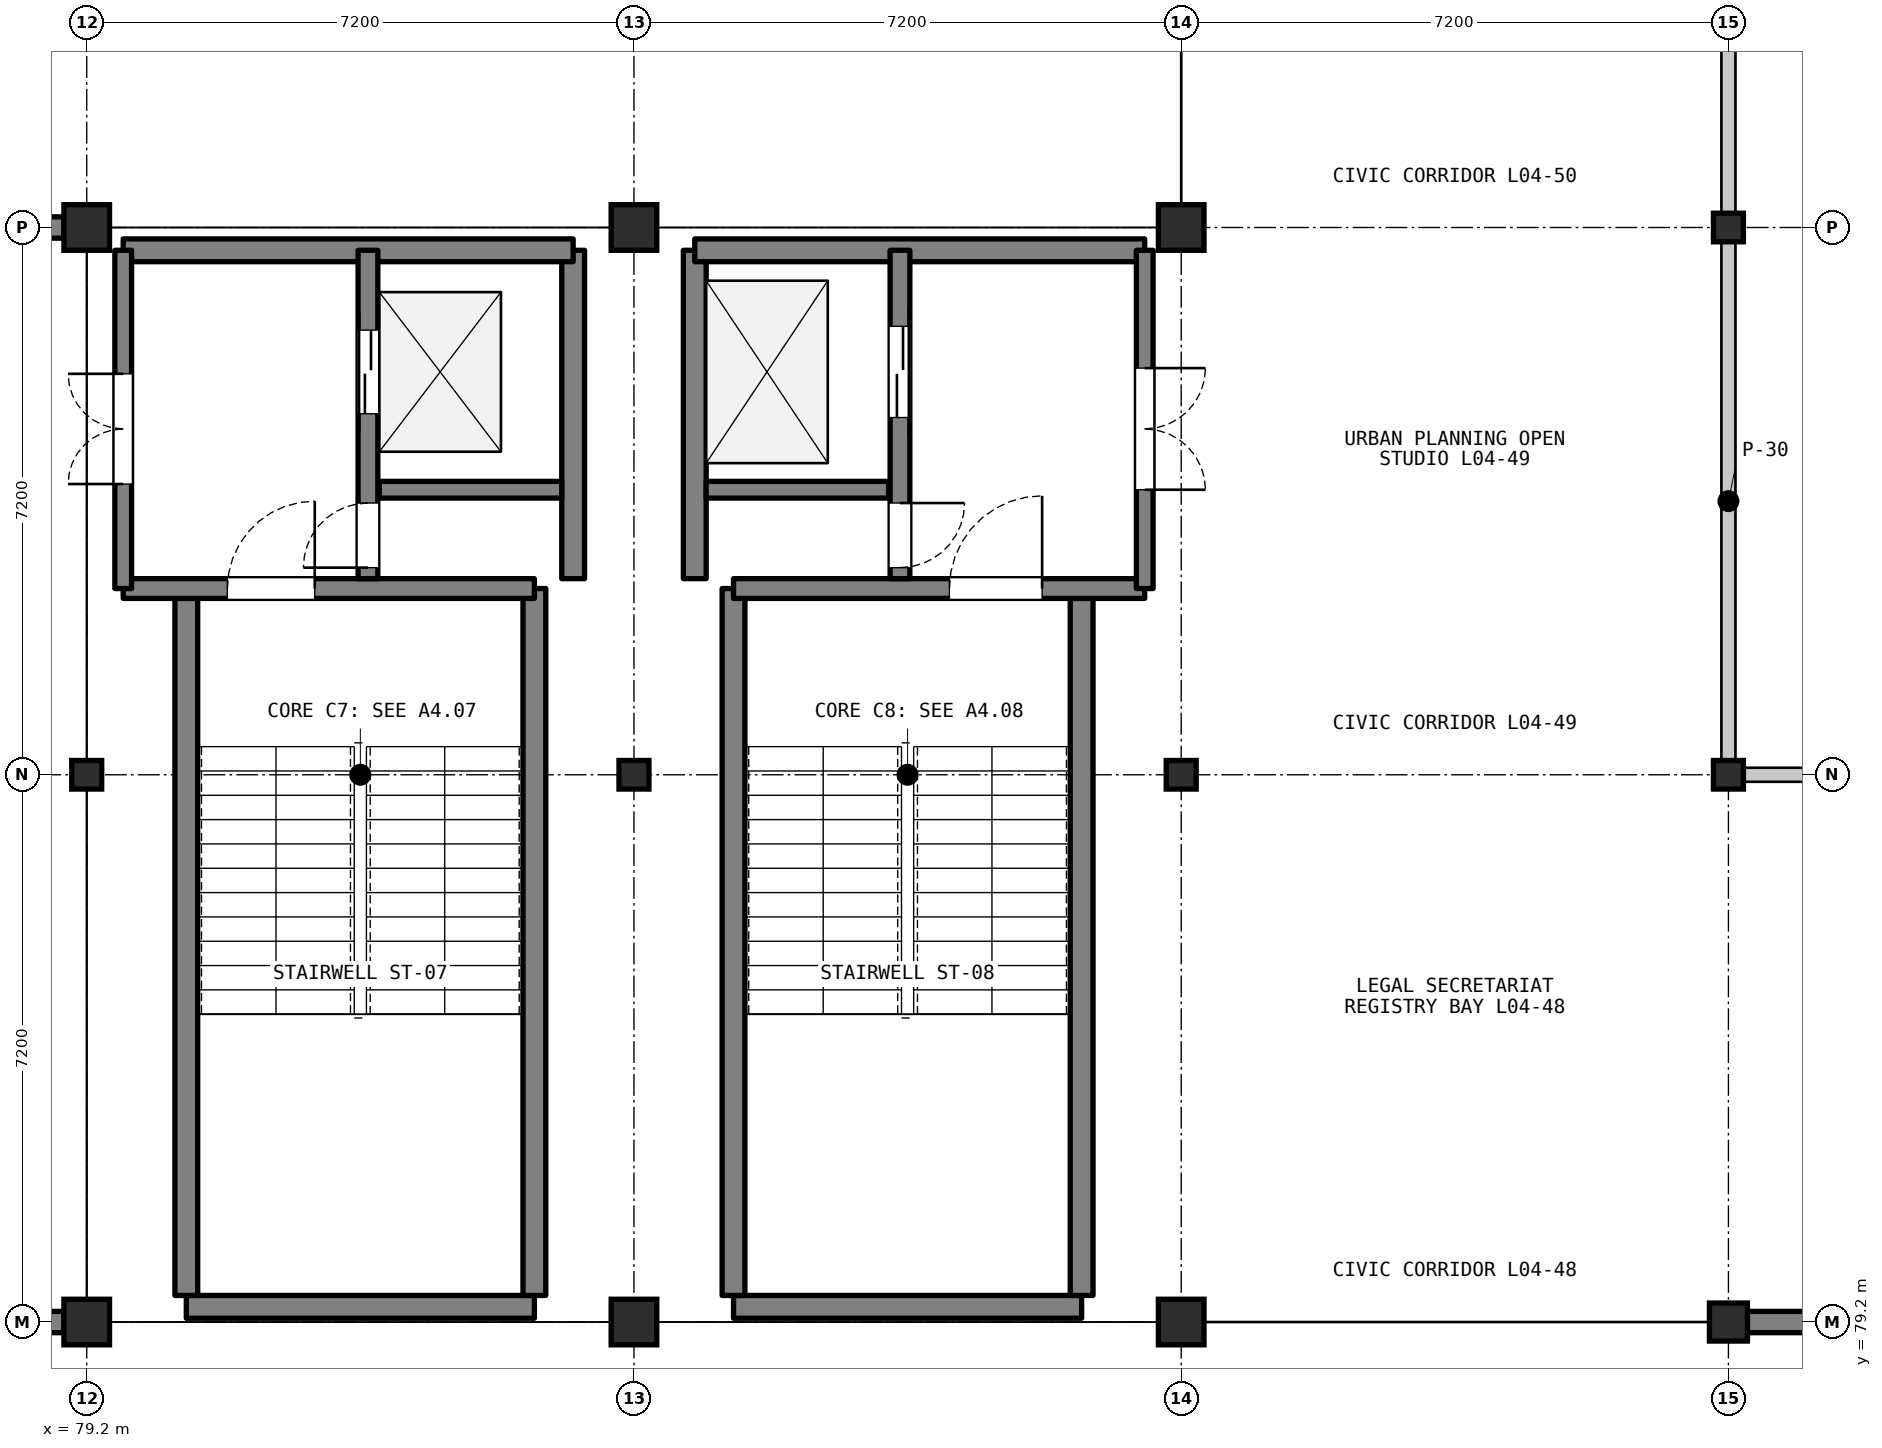
"""IFC4 building model, lengths in metres.
Left out: names, types, materials, properties, quantities, classifications, styles, units other than length and angle.
Written with IfcOpenShell. Run it as: python <this file> out.ifc"""

import sys

from ifc_helpers import new_model, si_unit, direction, frame, frame_2d, origin, origin_2d, place, context, subcontext, project, spatial, rectangle, i_section, extrude, element, fill, save


model = new_model("IFC4")
c1 = context("Model", 3, precision=1e-05, world=origin(), true_north=direction((0.0, 1.0)))
c2 = subcontext(c1, "Body", "Model", "MODEL_VIEW")
j1 = project(units=[si_unit("LENGTHUNIT", "METRE"), si_unit("PLANEANGLEUNIT", "RADIAN")], contexts=[c1])
p1 = place(None, origin())
s1 = spatial("IfcSite", under=j1, at=p1, CompositionType="ELEMENT")
p2 = place(p1, origin())
s2 = spatial("IfcBuilding", under=s1, at=p2, CompositionType="ELEMENT")
p3 = place(p2, frame((0.0, 0.0, 14.1)))
s3 = spatial("IfcBuildingStorey", under=s2, at=p3, CompositionType="ELEMENT", Elevation=14.1)
p4 = place(p3, frame((79.2, 79.2, 0.0), z_axis=(0.0, 0.0, 1.0), x_axis=(1.0, 0.0, 0.0)))
e1 = element("IfcColumn", 1, at=p4, inside=s3, PredefinedType="COLUMN", context=c2, shape_type="SweptSolid", body=[
    extrude(rectangle(XDim=0.6, YDim=0.6, at=origin_2d()), origin(), (0.0, 0.0, 1.0), 3.9),
])
p5 = place(p3, frame((79.2, 86.4, 0.0), z_axis=(0.0, 0.0, 1.0), x_axis=(1.0, 0.0, 0.0)))
e2 = element("IfcColumn", 2, at=p5, inside=s3, PredefinedType="COLUMN", context=c2, shape_type="SweptSolid", body=[
    extrude(i_section(OverallWidth=0.394, OverallDepth=0.376, WebThickness=0.017, FlangeThickness=0.028, FilletRadius=0.015, at=origin_2d()), origin(), (0.0, 0.0, 1.0), 3.9),
])
for number, where, z_axis, x_axis in (
    (3, (79.2, 93.6, 0.0), (0.0, 0.0, 1.0), (1.0, 0.0, 0.0)),
    (4, (86.4, 79.2, 0.0), (0.0, 0.0, 1.0), (1.0, 0.0, 0.0)),
):
    element("IfcColumn", number, at=place(p3, frame(where, z_axis=z_axis, x_axis=x_axis)), inside=s3, PredefinedType="COLUMN", context=c2, shape_type="SweptSolid", body=[
        extrude(rectangle(XDim=0.6, YDim=0.6, at=origin_2d()), origin(), (0.0, 0.0, 1.0), 3.9),
    ])
p6 = place(p3, frame((86.4, 86.4, 0.0), z_axis=(0.0, 0.0, 1.0), x_axis=(1.0, 0.0, 0.0)))
e5 = element("IfcColumn", 5, at=p6, inside=s3, PredefinedType="COLUMN", context=c2, shape_type="SweptSolid", body=[
    extrude(i_section(OverallWidth=0.394, OverallDepth=0.376, WebThickness=0.017, FlangeThickness=0.028, FilletRadius=0.015, at=origin_2d()), origin(), (0.0, 0.0, 1.0), 3.9),
])
for number, where, z_axis, x_axis in (
    (6, (86.4, 93.6, 0.0), (0.0, 0.0, 1.0), (1.0, 0.0, 0.0)),
    (7, (93.6, 79.2, 0.0), (0.0, 0.0, 1.0), (1.0, 0.0, 0.0)),
):
    element("IfcColumn", number, at=place(p3, frame(where, z_axis=z_axis, x_axis=x_axis)), inside=s3, PredefinedType="COLUMN", context=c2, shape_type="SweptSolid", body=[
        extrude(rectangle(XDim=0.6, YDim=0.6, at=origin_2d()), origin(), (0.0, 0.0, 1.0), 3.9),
    ])
p7 = place(p3, frame((93.6, 86.4, 0.0), z_axis=(0.0, 0.0, 1.0), x_axis=(1.0, 0.0, 0.0)))
e8 = element("IfcColumn", 8, at=p7, inside=s3, PredefinedType="COLUMN", context=c2, shape_type="SweptSolid", body=[
    extrude(i_section(OverallWidth=0.394, OverallDepth=0.376, WebThickness=0.017, FlangeThickness=0.028, FilletRadius=0.015, at=origin_2d()), origin(), (0.0, 0.0, 1.0), 3.9),
])
p8 = place(p3, frame((93.6, 93.6, 0.0), z_axis=(0.0, 0.0, 1.0), x_axis=(1.0, 0.0, 0.0)))
e9 = element("IfcColumn", 9, at=p8, inside=s3, PredefinedType="COLUMN", context=c2, shape_type="SweptSolid", body=[
    extrude(rectangle(XDim=0.6, YDim=0.6, at=origin_2d()), origin(), (0.0, 0.0, 1.0), 3.9),
])
p9 = place(p3, frame((100.8, 79.2, 0.0), z_axis=(0.0, 0.0, 1.0), x_axis=(1.0, 0.0, 0.0)))
e10 = element("IfcColumn", 10, at=p9, inside=s3, PredefinedType="COLUMN", context=c2, shape_type="SweptSolid", body=[
    extrude(rectangle(XDim=0.5, YDim=0.5, at=origin_2d()), origin(), (0.0, 0.0, 1.0), 3.9),
])
for number, where, z_axis, x_axis in (
    (11, (100.8, 86.4, 0.0), (0.0, 0.0, 1.0), (1.0, 0.0, 0.0)),
    (12, (100.8, 93.6, 0.0), (0.0, 0.0, 1.0), (1.0, 0.0, 0.0)),
):
    element("IfcColumn", number, at=place(p3, frame(where, z_axis=z_axis, x_axis=x_axis)), inside=s3, PredefinedType="COLUMN", context=c2, shape_type="SweptSolid", body=[
        extrude(i_section(OverallWidth=0.394, OverallDepth=0.376, WebThickness=0.017, FlangeThickness=0.028, FilletRadius=0.015, at=origin_2d()), origin(), (0.0, 0.0, 1.0), 3.9),
    ])
for number, where, z_axis, x_axis in (
    (13, (78.9, 79.2, 0.0), (0.0, 0.0, 1.0), (-1.0, 0.0, 0.0)),
    (14, (72.3, 93.6, 0.0), (0.0, 0.0, 1.0), (1.0, 0.0, 0.0)),
):
    element("IfcWall", number, at=place(p3, frame(where, z_axis=z_axis, x_axis=x_axis)), inside=s3, PredefinedType="SOLIDWALL", context=c2, shape_type="SweptSolid", body=[
        extrude(rectangle(XDim=6.6, YDim=0.28, at=frame_2d((3.3, 0.0))), origin(), (0.0, 0.0, 1.0), 3.118),
    ])
p10 = place(p3, frame((107.75, 79.2, 0.0), z_axis=(0.0, 0.0, 1.0), x_axis=(-1.0, 0.0, 0.0)))
e15 = element("IfcWall", 15, at=p10, inside=s3, PredefinedType="SOLIDWALL", context=c2, shape_type="SweptSolid", body=[
    extrude(rectangle(XDim=6.7, YDim=0.28, at=frame_2d((3.35, 0.0))), origin(), (0.0, 0.0, 1.0), 3.098),
])
p11 = place(p10, frame((1.008, 0.0, 0.95)))
e16 = element("IfcOpeningElement", 16, at=p11, cuts=e15, PredefinedType="OPENING", context=c2, shape_type="SweptSolid", body=[
    extrude(rectangle(XDim=1.2, YDim=1.7, at=frame_2d((0.6, 0.85))), frame((0.0, 0.15, 0.0), z_axis=(0.0, -1.0, 0.0), x_axis=(1.0, 0.0, 0.0)), (0.0, 0.0, 1.0), 0.3),
])
p12 = place(p10, frame((4.492, 0.0, 0.95)))
e17 = element("IfcOpeningElement", 17, at=p12, cuts=e15, PredefinedType="OPENING", context=c2, shape_type="SweptSolid", body=[
    extrude(rectangle(XDim=1.2, YDim=1.7, at=frame_2d((0.6, 0.85))), frame((0.0, 0.15, 0.0), z_axis=(0.0, -1.0, 0.0), x_axis=(1.0, 0.0, 0.0)), (0.0, 0.0, 1.0), 0.3),
])
p13 = place(p3, frame((80.51, 79.4, 0.0), z_axis=(0.0, 0.0, 1.0), x_axis=(1.0, 0.0, 0.0)))
e18 = element("IfcWall", 18, at=p13, inside=s3, PredefinedType="SHEAR", context=c2, shape_type="SweptSolid", body=[
    extrude(rectangle(XDim=4.58, YDim=0.3, at=frame_2d((2.29, 0.0))), origin(), (0.0, 0.0, 1.0), 3.72),
])
for number, where, z_axis, x_axis in (
    (19, (80.51, 79.55, 0.0), (0.0, 0.0, 1.0), (0.0, 1.0, 0.0)),
    (20, (85.09, 79.55, 0.0), (0.0, 0.0, 1.0), (0.0, 1.0, 0.0)),
):
    element("IfcWall", number, at=place(p3, frame(where, z_axis=z_axis, x_axis=x_axis)), inside=s3, PredefinedType="SHEAR", context=c2, shape_type="SweptSolid", body=[
        extrude(rectangle(XDim=9.3, YDim=0.3, at=frame_2d((4.65, 0.0))), origin(), (0.0, 0.0, 1.0), 3.72),
    ])
p14 = place(p3, frame((79.68, 88.85, 0.0), z_axis=(0.0, 0.0, 1.0), x_axis=(1.0, 0.0, 0.0)))
e21 = element("IfcWall", 21, at=p14, inside=s3, PredefinedType="SHEAR", context=c2, shape_type="SweptSolid", body=[
    extrude(rectangle(XDim=5.41, YDim=0.26, at=frame_2d((2.705, 0.0))), origin(), (0.0, 0.0, 1.0), 3.72),
])
p15 = place(p14, frame((1.37, 0.0, 0.0)))
e22 = element("IfcOpeningElement", 22, at=p15, cuts=e21, PredefinedType="OPENING", context=c2, shape_type="SweptSolid", body=[
    extrude(rectangle(XDim=1.15, YDim=2.15, at=frame_2d((0.575, 1.075))), frame((0.0, 0.14, 0.0), z_axis=(0.0, -1.0, 0.0), x_axis=(1.0, 0.0, 0.0)), (0.0, 0.0, 1.0), 0.28),
])
p16 = place(p3, frame((85.6, 88.98, 0.0), z_axis=(0.0, 0.0, 1.0), x_axis=(0.0, 1.0, 0.0)))
e23 = element("IfcWall", 23, at=p16, inside=s3, PredefinedType="SHEAR", context=c2, shape_type="SweptSolid", body=[
    extrude(rectangle(XDim=4.32, YDim=0.3, at=frame_2d((2.16, 0.0))), origin(), (0.0, 0.0, 1.0), 3.72),
])
p17 = place(p3, frame((79.68, 93.3, 0.0), z_axis=(0.0, 0.0, 1.0), x_axis=(1.0, 0.0, 0.0)))
e24 = element("IfcWall", 24, at=p17, inside=s3, PredefinedType="SHEAR", context=c2, shape_type="SweptSolid", body=[
    extrude(rectangle(XDim=5.92, YDim=0.3, at=frame_2d((2.96, 0.0))), origin(), (0.0, 0.0, 1.0), 3.72),
])
p18 = place(p3, frame((83.05, 90.15, 0.0), z_axis=(0.0, 0.0, 1.0), x_axis=(1.0, 0.0, 0.0)))
e25 = element("IfcWall", 25, at=p18, inside=s3, PredefinedType="SHEAR", context=c2, shape_type="SweptSolid", body=[
    extrude(rectangle(XDim=2.4, YDim=0.22, at=frame_2d((1.2, 0.0))), origin(), (0.0, 0.0, 1.0), 3.72),
])
p19 = place(p3, frame((82.9, 88.98, 0.0), z_axis=(0.0, 0.0, 1.0), x_axis=(0.0, 1.0, 0.0)))
e26 = element("IfcWall", 26, at=p19, inside=s3, PredefinedType="SHEAR", context=c2, shape_type="SweptSolid", body=[
    extrude(rectangle(XDim=4.32, YDim=0.26, at=frame_2d((2.16, 0.0))), origin(), (0.0, 0.0, 1.0), 3.72),
])
p20 = place(p19, frame((2.17, 0.0, 0.0)))
e27 = element("IfcOpeningElement", 27, at=p20, cuts=e26, PredefinedType="OPENING", context=c2, shape_type="SweptSolid", body=[
    extrude(rectangle(XDim=1.1, YDim=2.15, at=frame_2d((0.55, 1.075))), frame((0.0, 0.14, 0.0), z_axis=(0.0, -1.0, 0.0), x_axis=(1.0, 0.0, 0.0)), (0.0, 0.0, 1.0), 0.28),
])
p21 = place(p19, frame((0.145, 0.0, 0.0)))
e28 = element("IfcOpeningElement", 28, at=p21, cuts=e26, PredefinedType="OPENING", context=c2, shape_type="SweptSolid", body=[
    extrude(rectangle(XDim=0.85, YDim=2.05, at=frame_2d((0.425, 1.025))), frame((0.0, 0.14, 0.0), z_axis=(0.0, -1.0, 0.0), x_axis=(1.0, 0.0, 0.0)), (0.0, 0.0, 1.0), 0.28),
])
p22 = place(p3, frame((79.68, 88.85, 0.0), z_axis=(0.0, 0.0, 1.0), x_axis=(0.0, 1.0, 0.0)))
e29 = element("IfcWall", 29, at=p22, inside=s3, PredefinedType="SHEAR", context=c2, shape_type="SweptSolid", body=[
    extrude(rectangle(XDim=4.45, YDim=0.22, at=frame_2d((2.225, 0.0))), origin(), (0.0, 0.0, 1.0), 3.72),
])
p23 = place(p22, frame((1.375, 0.0, 0.0)))
e30 = element("IfcOpeningElement", 30, at=p23, cuts=e29, PredefinedType="OPENING", context=c2, shape_type="SweptSolid", body=[
    extrude(rectangle(XDim=1.45, YDim=2.2, at=frame_2d((0.725, 1.1))), frame((0.0, 0.12, 0.0), z_axis=(0.0, -1.0, 0.0), x_axis=(1.0, 0.0, 0.0)), (0.0, 0.0, 1.0), 0.24),
])
p24 = place(p3, frame((87.71, 79.4, 0.0), z_axis=(0.0, 0.0, 1.0), x_axis=(1.0, 0.0, 0.0)))
e31 = element("IfcWall", 31, at=p24, inside=s3, PredefinedType="SHEAR", context=c2, shape_type="SweptSolid", body=[
    extrude(rectangle(XDim=4.58, YDim=0.3, at=frame_2d((2.29, 0.0))), origin(), (0.0, 0.0, 1.0), 3.72),
])
for number, where, z_axis, x_axis in (
    (32, (87.71, 79.55, 0.0), (0.0, 0.0, 1.0), (0.0, 1.0, 0.0)),
    (33, (92.29, 79.55, 0.0), (0.0, 0.0, 1.0), (0.0, 1.0, 0.0)),
):
    element("IfcWall", number, at=place(p3, frame(where, z_axis=z_axis, x_axis=x_axis)), inside=s3, PredefinedType="SHEAR", context=c2, shape_type="SweptSolid", body=[
        extrude(rectangle(XDim=9.3, YDim=0.3, at=frame_2d((4.65, 0.0))), origin(), (0.0, 0.0, 1.0), 3.72),
    ])
p25 = place(p3, frame((87.71, 88.85, 0.0), z_axis=(0.0, 0.0, 1.0), x_axis=(1.0, 0.0, 0.0)))
e34 = element("IfcWall", 34, at=p25, inside=s3, PredefinedType="SHEAR", context=c2, shape_type="SweptSolid", body=[
    extrude(rectangle(XDim=5.41, YDim=0.26, at=frame_2d((2.705, 0.0))), origin(), (0.0, 0.0, 1.0), 3.72),
])
p26 = place(p25, frame((2.84, 0.0, 0.0)))
e35 = element("IfcOpeningElement", 35, at=p26, cuts=e34, PredefinedType="OPENING", context=c2, shape_type="SweptSolid", body=[
    extrude(rectangle(XDim=1.22, YDim=2.15, at=frame_2d((0.61, 1.075))), frame((0.0, 0.14, 0.0), z_axis=(0.0, -1.0, 0.0), x_axis=(1.0, 0.0, 0.0)), (0.0, 0.0, 1.0), 0.28),
])
p27 = place(p3, frame((87.2, 88.98, 0.0), z_axis=(0.0, 0.0, 1.0), x_axis=(0.0, 1.0, 0.0)))
e36 = element("IfcWall", 36, at=p27, inside=s3, PredefinedType="SHEAR", context=c2, shape_type="SweptSolid", body=[
    extrude(rectangle(XDim=4.32, YDim=0.3, at=frame_2d((2.16, 0.0))), origin(), (0.0, 0.0, 1.0), 3.72),
])
p28 = place(p3, frame((87.2, 93.3, 0.0), z_axis=(0.0, 0.0, 1.0), x_axis=(1.0, 0.0, 0.0)))
e37 = element("IfcWall", 37, at=p28, inside=s3, PredefinedType="SHEAR", context=c2, shape_type="SweptSolid", body=[
    extrude(rectangle(XDim=5.92, YDim=0.3, at=frame_2d((2.96, 0.0))), origin(), (0.0, 0.0, 1.0), 3.72),
])
p29 = place(p3, frame((87.35, 90.15, 0.0), z_axis=(0.0, 0.0, 1.0), x_axis=(1.0, 0.0, 0.0)))
e38 = element("IfcWall", 38, at=p29, inside=s3, PredefinedType="SHEAR", context=c2, shape_type="SweptSolid", body=[
    extrude(rectangle(XDim=2.4, YDim=0.22, at=frame_2d((1.2, 0.0))), origin(), (0.0, 0.0, 1.0), 3.72),
])
p30 = place(p3, frame((89.9, 93.3, 0.0), z_axis=(0.0, 0.0, 1.0), x_axis=(0.0, -1.0, 0.0)))
e39 = element("IfcWall", 39, at=p30, inside=s3, PredefinedType="SHEAR", context=c2, shape_type="SweptSolid", body=[
    extrude(rectangle(XDim=4.32, YDim=0.26, at=frame_2d((2.16, 0.0))), origin(), (0.0, 0.0, 1.0), 3.72),
])
p31 = place(p30, frame((1.0, 0.0, 0.0)))
e40 = element("IfcOpeningElement", 40, at=p31, cuts=e39, PredefinedType="OPENING", context=c2, shape_type="SweptSolid", body=[
    extrude(rectangle(XDim=1.2, YDim=2.15, at=frame_2d((0.6, 1.075))), frame((0.0, 0.14, 0.0), z_axis=(0.0, -1.0, 0.0), x_axis=(1.0, 0.0, 0.0)), (0.0, 0.0, 1.0), 0.28),
])
p32 = place(p30, frame((3.325, 0.0, 0.0)))
e41 = element("IfcOpeningElement", 41, at=p32, cuts=e39, PredefinedType="OPENING", context=c2, shape_type="SweptSolid", body=[
    extrude(rectangle(XDim=0.85, YDim=2.05, at=frame_2d((0.425, 1.025))), frame((0.0, 0.14, 0.0), z_axis=(0.0, -1.0, 0.0), x_axis=(1.0, 0.0, 0.0)), (0.0, 0.0, 1.0), 0.28),
])
p33 = place(p3, frame((93.12, 93.3, 0.0), z_axis=(0.0, 0.0, 1.0), x_axis=(0.0, -1.0, 0.0)))
e42 = element("IfcWall", 42, at=p33, inside=s3, PredefinedType="SHEAR", context=c2, shape_type="SweptSolid", body=[
    extrude(rectangle(XDim=4.45, YDim=0.22, at=frame_2d((2.225, 0.0))), origin(), (0.0, 0.0, 1.0), 3.72),
])
p34 = place(p33, frame((1.55, 0.0, 0.0)))
e43 = element("IfcOpeningElement", 43, at=p34, cuts=e42, PredefinedType="OPENING", context=c2, shape_type="SweptSolid", body=[
    extrude(rectangle(XDim=1.6, YDim=2.2, at=frame_2d((0.8, 1.1))), frame((0.0, 0.12, 0.0), z_axis=(0.0, -1.0, 0.0), x_axis=(1.0, 0.0, 0.0)), (0.0, 0.0, 1.0), 0.24),
])
p35 = place(p3, frame((107.88, 86.4, 0.0), z_axis=(0.0, 0.0, 1.0), x_axis=(-1.0, 0.0, 0.0)))
e44 = element("IfcWall", 44, at=p35, inside=s3, PredefinedType="PARTITIONING", context=c2, shape_type="SweptSolid", body=[
    extrude(rectangle(XDim=6.96, YDim=0.185, at=frame_2d((3.48, 0.0))), origin(), (0.0, 0.0, 1.0), 3.088),
])
p36 = place(p35, frame((2.94, 0.0, 0.0)))
e45 = element("IfcOpeningElement", 45, at=p36, cuts=e44, PredefinedType="OPENING", context=c2, shape_type="SweptSolid", body=[
    extrude(rectangle(XDim=1.08, YDim=2.2, at=frame_2d((0.54, 1.1))), frame((0.0, 0.103, 0.0), z_axis=(0.0, -1.0, 0.0), x_axis=(1.0, 0.0, 0.0)), (0.0, 0.0, 1.0), 0.205),
])
p37 = place(p35, frame((0.45, 0.0, 1.05)))
e46 = element("IfcOpeningElement", 46, at=p37, cuts=e44, PredefinedType="OPENING", context=c2, shape_type="SweptSolid", body=[
    extrude(rectangle(XDim=2.2, YDim=1.25, at=frame_2d((1.1, 0.625))), frame((0.0, 0.103, 0.0), z_axis=(0.0, -1.0, 0.0), x_axis=(1.0, 0.0, 0.0)), (0.0, 0.0, 1.0), 0.205),
])
for number, where, z_axis, x_axis in (
    (47, (100.8, 86.52, 0.0), (0.0, 0.0, 1.0), (0.0, 1.0, 0.0)),
    (48, (100.8, 93.72, 0.0), (0.0, 0.0, 1.0), (0.0, 1.0, 0.0)),
):
    element("IfcWall", number, at=place(p3, frame(where, z_axis=z_axis, x_axis=x_axis)), inside=s3, PredefinedType="PARTITIONING", context=c2, shape_type="SweptSolid", body=[
        extrude(rectangle(XDim=6.96, YDim=0.185, at=frame_2d((3.48, 0.0))), origin(), (0.0, 0.0, 1.0), 3.088),
    ])
p38 = place(p15, origin())
e49 = element("IfcDoor", 49, at=p38, inside=s3, OperationType="SINGLE_SWING_RIGHT", PredefinedType="DOOR", context=c2, shape_type="SweptSolid", body=[
    extrude(rectangle(XDim=1.15, YDim=2.15, at=frame_2d((0.575, 1.075))), frame((0.0, 0.025, 0.0), z_axis=(0.0, -1.0, 0.0), x_axis=(1.0, 0.0, 0.0)), (0.0, 0.0, 1.0), 0.05),
])
fill(e22, e49)
p39 = place(p20, origin())
e50 = element("IfcDoor", 50, at=p39, inside=s3, OperationType="DOUBLE_DOOR_SLIDING", PredefinedType="DOOR", context=c2, shape_type="SweptSolid", body=[
    extrude(rectangle(XDim=1.1, YDim=2.15, at=frame_2d((0.55, 1.075))), frame((0.0, 0.025, 0.0), z_axis=(0.0, -1.0, 0.0), x_axis=(1.0, 0.0, 0.0)), (0.0, 0.0, 1.0), 0.05),
])
fill(e27, e50)
p40 = place(p21, origin())
e51 = element("IfcDoor", 51, at=p40, inside=s3, OperationType="SINGLE_SWING_LEFT", PredefinedType="DOOR", context=c2, shape_type="SweptSolid", body=[
    extrude(rectangle(XDim=0.85, YDim=2.05, at=frame_2d((0.425, 1.025))), frame((0.0, 0.025, 0.0), z_axis=(0.0, -1.0, 0.0), x_axis=(1.0, 0.0, 0.0)), (0.0, 0.0, 1.0), 0.05),
])
fill(e28, e51)
p41 = place(p23, origin())
e52 = element("IfcDoor", 52, at=p41, inside=s3, OperationType="DOUBLE_DOOR_SINGLE_SWING", PredefinedType="DOOR", context=c2, shape_type="SweptSolid", body=[
    extrude(rectangle(XDim=1.45, YDim=2.2, at=frame_2d((0.725, 1.1))), frame((0.0, 0.025, 0.0), z_axis=(0.0, -1.0, 0.0), x_axis=(1.0, 0.0, 0.0)), (0.0, 0.0, 1.0), 0.05),
])
fill(e30, e52)
p42 = place(p26, origin())
e53 = element("IfcDoor", 53, at=p42, inside=s3, OperationType="SINGLE_SWING_RIGHT", PredefinedType="DOOR", context=c2, shape_type="SweptSolid", body=[
    extrude(rectangle(XDim=1.22, YDim=2.15, at=frame_2d((0.61, 1.075))), frame((0.0, 0.025, 0.0), z_axis=(0.0, -1.0, 0.0), x_axis=(1.0, 0.0, 0.0)), (0.0, 0.0, 1.0), 0.05),
])
fill(e35, e53)
p43 = place(p31, origin())
e54 = element("IfcDoor", 54, at=p43, inside=s3, OperationType="DOUBLE_DOOR_SLIDING", PredefinedType="DOOR", context=c2, shape_type="SweptSolid", body=[
    extrude(rectangle(XDim=1.2, YDim=2.15, at=frame_2d((0.6, 1.075))), frame((0.0, 0.025, 0.0), z_axis=(0.0, -1.0, 0.0), x_axis=(1.0, 0.0, 0.0)), (0.0, 0.0, 1.0), 0.05),
])
fill(e40, e54)
p44 = place(p32, origin())
e55 = element("IfcDoor", 55, at=p44, inside=s3, OperationType="SINGLE_SWING_LEFT", PredefinedType="DOOR", context=c2, shape_type="SweptSolid", body=[
    extrude(rectangle(XDim=0.85, YDim=2.05, at=frame_2d((0.425, 1.025))), frame((0.0, 0.025, 0.0), z_axis=(0.0, -1.0, 0.0), x_axis=(1.0, 0.0, 0.0)), (0.0, 0.0, 1.0), 0.05),
])
fill(e41, e55)
p45 = place(p34, origin())
e56 = element("IfcDoor", 56, at=p45, inside=s3, OperationType="DOUBLE_DOOR_SINGLE_SWING", PredefinedType="DOOR", context=c2, shape_type="SweptSolid", body=[
    extrude(rectangle(XDim=1.6, YDim=2.2, at=frame_2d((0.8, 1.1))), frame((0.0, 0.025, 0.0), z_axis=(0.0, -1.0, 0.0), x_axis=(1.0, 0.0, 0.0)), (0.0, 0.0, 1.0), 0.05),
])
fill(e43, e56)
save(model, sys.argv[1])
